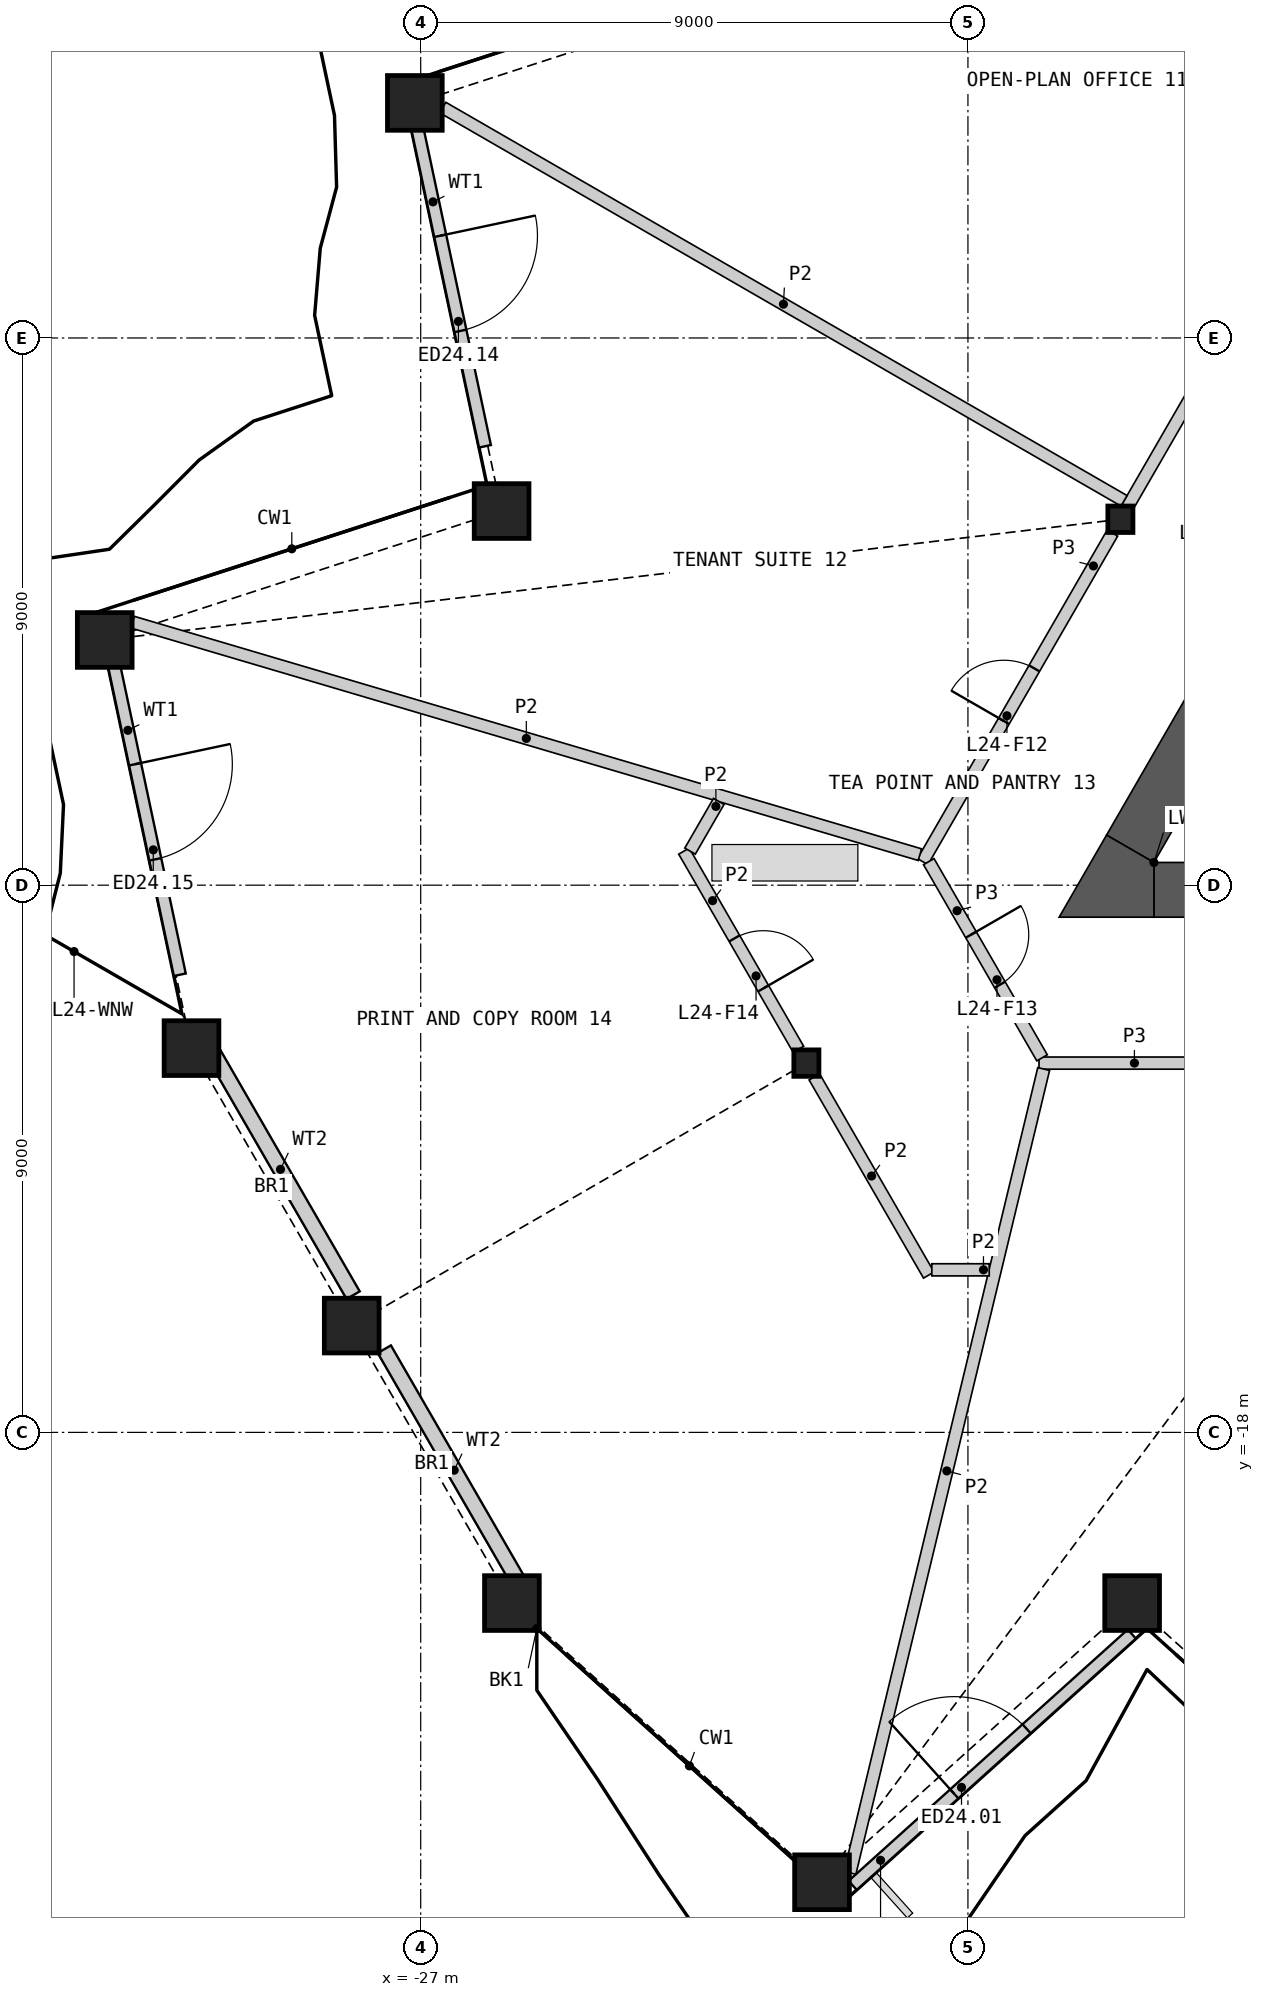
"""IFC4 building model, lengths in metres.
Left out: names, types, materials, properties, quantities, classifications, styles, units other than length and angle.
Written with IfcOpenShell. Run it as: python <this file> out.ifc"""

import sys

from ifc_helpers import new_model, si_unit, direction, frame, frame_2d, origin, origin_2d, place, context, subcontext, project, spatial, polyline, rectangle, hollow_rectangle, i_section, outline, extrude, element, fill, save


model = new_model("IFC4")
c1 = context("Model", 3, precision=1e-05, world=origin(), true_north=direction((0.0, 1.0)))
c2 = subcontext(c1, "Body", "Model", "MODEL_VIEW")
j1 = project(units=[si_unit("LENGTHUNIT", "METRE"), si_unit("PLANEANGLEUNIT", "RADIAN")], contexts=[c1])
p1 = place(None, origin())
s1 = spatial("IfcSite", under=j1, at=p1, CompositionType="ELEMENT")
p2 = place(p1, origin())
s2 = spatial("IfcBuilding", under=s1, at=p2, CompositionType="ELEMENT")
p3 = place(p2, frame((0.0, 0.0, 116.4)))
s3 = spatial("IfcBuildingStorey", under=s2, at=p3, CompositionType="ELEMENT", Elevation=116.4)
for number, where, z_axis, x_axis in (
    (1, (-25.5, -20.807, 0.0), (0.0, 0.0, 1.0), (1.0, 0.0, 0.0)),
    (2, (-20.4, -25.399, 0.0), (0.0, 0.0, 1.0), (1.0, 0.0, 0.0)),
    (3, (-15.3, -20.807, 0.0), (0.0, 0.0, 1.0), (1.0, 0.0, 0.0)),
    (4, (-27.096, 3.866, 0.0), (0.0, 0.0, 1.0), (1.0, 0.0, 0.0)),
    (5, (-25.669, -2.846, 0.0), (0.0, 0.0, 1.0), (1.0, 0.0, 0.0)),
    (6, (-32.196, -4.967, 0.0), (0.0, 0.0, 1.0), (1.0, 0.0, 0.0)),
    (7, (-30.769, -11.68, 0.0), (0.0, 0.0, 1.0), (1.0, 0.0, 0.0)),
    (8, (-28.135, -16.243, 0.0), (0.0, 0.0, 1.0), (1.0, 0.0, 0.0)),
):
    element("IfcColumn", number, at=place(p3, frame(where, z_axis=z_axis, x_axis=x_axis)), inside=s3, PredefinedType="COLUMN", context=c2, shape_type="SweptSolid", body=[
        extrude(hollow_rectangle(XDim=0.9, YDim=0.9, WallThickness=0.06, at=origin_2d()), origin(), (0.0, 0.0, 1.0), 4.2),
    ])
for number, where, z_axis, x_axis in (
    (9, (-15.493, -2.982, 0.0), (0.0, 0.0, 1.0), (1.0, 0.0, 0.0)),
    (10, (-20.657, -11.926, 0.0), (0.0, 0.0, 1.0), (1.0, 0.0, 0.0)),
):
    element("IfcColumn", number, at=place(p3, frame(where, z_axis=z_axis, x_axis=x_axis)), inside=s3, PredefinedType="COLUMN", context=c2, shape_type="SweptSolid", body=[
        extrude(i_section(OverallWidth=0.412, OverallDepth=0.435, WebThickness=0.036, FlangeThickness=0.057, at=origin_2d()), origin(), (0.0, 0.0, 1.0), 4.2),
    ])
p4 = place(p3, frame((-19.896, -25.451, 0.0), z_axis=(0.0, 0.0, 1.0), x_axis=(0.743162487272, 0.669110990428, 0.0)))
e11 = element("IfcWall", 11, at=p4, inside=s3, PredefinedType="SOLIDWALL", context=c2, shape_type="SweptSolid", body=[
    extrude(rectangle(XDim=6.178, YDim=0.2, at=frame_2d((3.089, 0.0))), origin(), (0.0, 0.0, 1.0), 3.189),
])
p5 = place(p4, frame((2.25, 0.0, 0.0)))
e12 = element("IfcOpeningElement", 12, at=p5, cuts=e11, PredefinedType="OPENING", context=c2, shape_type="SweptSolid", body=[
    extrude(rectangle(XDim=1.6, YDim=2.4, at=frame_2d((0.8, 1.2))), frame((0.0, 0.11, 0.0), z_axis=(0.0, -1.0, 0.0), x_axis=(1.0, 0.0, 0.0)), (0.0, 0.0, 1.0), 0.22),
])
p6 = place(p3, frame((-27.083, 3.579, 0.0), z_axis=(0.0, 0.0, 1.0), x_axis=(0.207898180805, -0.978150472278, 0.0)))
e13 = element("IfcWall", 13, at=p6, inside=s3, PredefinedType="SOLIDWALL", context=c2, shape_type="SweptSolid", body=[
    extrude(rectangle(XDim=5.48, YDim=0.2, at=frame_2d((2.74, 0.0))), origin(), (0.0, 0.0, 1.0), 3.189),
])
p7 = place(p6, frame((1.94, 0.0, 0.0)))
e14 = element("IfcOpeningElement", 14, at=p7, cuts=e13, PredefinedType="OPENING", context=c2, shape_type="SweptSolid", body=[
    extrude(rectangle(XDim=1.6, YDim=2.4, at=frame_2d((0.8, 1.2))), frame((0.0, 0.11, 0.0), z_axis=(0.0, -1.0, 0.0), x_axis=(1.0, 0.0, 0.0)), (0.0, 0.0, 1.0), 0.22),
])
p8 = place(p3, frame((-32.101, -5.113, 0.0), z_axis=(0.0, 0.0, 1.0), x_axis=(0.207949862117, -0.978139486395, 0.0)))
e15 = element("IfcWall", 15, at=p8, inside=s3, PredefinedType="SOLIDWALL", context=c2, shape_type="SweptSolid", body=[
    extrude(rectangle(XDim=5.48, YDim=0.2, at=frame_2d((2.74, 0.0))), origin(), (0.0, 0.0, 1.0), 3.189),
])
p9 = place(p8, frame((1.94, 0.0, 0.0)))
e16 = element("IfcOpeningElement", 16, at=p9, cuts=e15, PredefinedType="OPENING", context=c2, shape_type="SweptSolid", body=[
    extrude(rectangle(XDim=1.6, YDim=2.4, at=frame_2d((0.8, 1.2))), frame((0.0, 0.11, 0.0), z_axis=(0.0, -1.0, 0.0), x_axis=(1.0, 0.0, 0.0)), (0.0, 0.0, 1.0), 0.22),
])
p10 = place(p3, frame((-30.5, -11.604, 0.0), z_axis=(0.0, 0.0, 1.0), x_axis=(0.499984810975, -0.866034172995, 0.0)))
e17 = element("IfcWall", 17, at=p10, inside=s3, PredefinedType="SOLIDWALL", context=c2, shape_type="SweptSolid", body=[
    extrude(rectangle(XDim=4.78, YDim=0.25, at=frame_2d((2.39, 0.0))), origin(), (0.0, 0.0, 1.0), 3.189),
])
p11 = place(p3, frame((-27.598, -16.632, 0.0), z_axis=(0.0, 0.0, 1.0), x_axis=(0.500018268964, -0.866014855936, 0.0)))
e18 = element("IfcWall", 18, at=p11, inside=s3, PredefinedType="SOLIDWALL", context=c2, shape_type="SweptSolid", body=[
    extrude(rectangle(XDim=4.596, YDim=0.25, at=frame_2d((2.298, 0.0))), origin(), (0.0, 0.0, 1.0), 3.189),
])
p12 = place(p3, frame((-14.941, -9.076, 0.0), z_axis=(0.0, 0.0, 1.0), x_axis=(1.0, 0.0, 0.0)))
e19 = element("IfcWall", 19, at=p12, inside=s3, PredefinedType="SHEAR", context=c2, shape_type="SweptSolid", body=[
    extrude(rectangle(XDim=7.649, YDim=0.9, at=frame_2d((3.824, 0.0))), origin(), (0.0, 0.0, 1.0), 3.8),
])
p13 = place(p3, frame((-13.271, -4.833, 0.0), z_axis=(0.0, 0.0, 1.0), x_axis=(-0.499994272862, -0.866028710324, 0.0)))
e20 = element("IfcWall", 20, at=p13, inside=s3, PredefinedType="SHEAR", context=c2, shape_type="SweptSolid", body=[
    extrude(rectangle(XDim=4.121, YDim=0.9, at=frame_2d((2.06, 0.0))), origin(), (0.0, 0.0, 1.0), 3.8),
])
p14 = place(p3, origin())
e21 = element("IfcWall", 21, at=p14, inside=s3, PredefinedType="SHEAR", context=c2, shape_type="SweptSolid", body=[
    extrude(outline(polyline([(-14.941, -8.626), (-14.941, -9.526), (-16.5, -9.526), (-15.721, -8.176), (-14.941, -8.626)])), origin(), (0.0, 0.0, 1.0), 3.8),
])
p15 = place(p3, frame((-15.402, -2.823, 0.0), z_axis=(0.0, 0.0, 1.0), x_axis=(0.500023237168, 0.866011987384, 0.0)))
e22 = element("IfcWall", 22, at=p15, inside=s3, PredefinedType="PARTITIONING", context=c2, shape_type="SweptSolid", body=[
    extrude(rectangle(XDim=9.883, YDim=0.2, at=frame_2d((4.942, 0.0))), origin(), (0.0, 0.0, 1.0), 3.8),
])
p16 = place(p15, frame((4.492, 0.0, 0.0)))
e23 = element("IfcOpeningElement", 23, at=p16, cuts=e22, PredefinedType="OPENING", context=c2, shape_type="SweptSolid", body=[
    extrude(rectangle(XDim=1.0, YDim=2.1, at=frame_2d((0.5, 1.05))), frame((0.0, 0.11, 0.0), z_axis=(0.0, -1.0, 0.0), x_axis=(1.0, 0.0, 0.0)), (0.0, 0.0, 1.0), 0.22),
])
p17 = place(p3, frame((-16.831, -11.926, 0.0), z_axis=(0.0, 0.0, 1.0), x_axis=(1.0, 0.0, 0.0)))
e24 = element("IfcWall", 24, at=p17, inside=s3, PredefinedType="PARTITIONING", context=c2, shape_type="SweptSolid", body=[
    extrude(rectangle(XDim=6.275, YDim=0.2, at=frame_2d((3.137, 0.0))), origin(), (0.0, 0.0, 1.0), 3.8),
])
p18 = place(p17, frame((2.688, 0.0, 0.0)))
e25 = element("IfcOpeningElement", 25, at=p18, cuts=e24, PredefinedType="OPENING", context=c2, shape_type="SweptSolid", body=[
    extrude(rectangle(XDim=1.0, YDim=2.1, at=frame_2d((0.5, 1.05))), frame((0.0, 0.11, 0.0), z_axis=(0.0, -1.0, 0.0), x_axis=(1.0, 0.0, 0.0)), (0.0, 0.0, 1.0), 0.22),
])
p19 = place(p3, frame((-18.744, -8.613, 0.0), z_axis=(0.0, 0.0, 1.0), x_axis=(0.499997920671, 0.866026604282, 0.0)))
e26 = element("IfcWall", 26, at=p19, inside=s3, PredefinedType="PARTITIONING", context=c2, shape_type="SweptSolid", body=[
    extrude(rectangle(XDim=6.24, YDim=0.2, at=frame_2d((3.12, 0.0))), origin(), (0.0, 0.0, 1.0), 3.8),
])
p20 = place(p19, frame((2.67, 0.0, 0.0)))
e27 = element("IfcOpeningElement", 27, at=p20, cuts=e26, PredefinedType="OPENING", context=c2, shape_type="SweptSolid", body=[
    extrude(rectangle(XDim=1.0, YDim=2.1, at=frame_2d((0.5, 1.05))), frame((0.0, 0.11, 0.0), z_axis=(0.0, -1.0, 0.0), x_axis=(1.0, 0.0, 0.0)), (0.0, 0.0, 1.0), 0.22),
])
p21 = place(p3, frame((-18.644, -8.613, 0.0), z_axis=(0.0, 0.0, 1.0), x_axis=(0.499958791762, -0.866049194065, 0.0)))
e28 = element("IfcWall", 28, at=p21, inside=s3, PredefinedType="PARTITIONING", context=c2, shape_type="SweptSolid", body=[
    extrude(rectangle(XDim=3.726, YDim=0.2, at=frame_2d((1.863, 0.0))), origin(), (0.0, 0.0, 1.0), 3.8),
])
p22 = place(p21, frame((1.388, 0.0, 0.0)))
e29 = element("IfcOpeningElement", 29, at=p22, cuts=e28, PredefinedType="OPENING", context=c2, shape_type="SweptSolid", body=[
    extrude(rectangle(XDim=0.95, YDim=2.1, at=frame_2d((0.475, 1.05))), frame((0.0, 0.11, 0.0), z_axis=(0.0, -1.0, 0.0), x_axis=(1.0, 0.0, 0.0)), (0.0, 0.0, 1.0), 0.22),
])
p23 = place(p3, frame((-19.94, -25.244, 0.0), z_axis=(0.0, 0.0, 1.0), x_axis=(0.234226353532, 0.972182089586, 0.0)))
e30 = element("IfcWall", 30, at=p23, inside=s3, PredefinedType="PARTITIONING", context=c2, shape_type="SweptSolid", body=[
    extrude(rectangle(XDim=13.599, YDim=0.2, at=frame_2d((6.8, 0.0))), origin(), (0.0, 0.0, 1.0), 2.885),
])
p24 = place(p3, frame((-31.736, -4.675, 0.0), z_axis=(0.0, 0.0, 1.0), x_axis=(0.959053889024, -0.283223653581, 0.0)))
e31 = element("IfcWall", 31, at=p24, inside=s3, PredefinedType="PARTITIONING", context=c2, shape_type="SweptSolid", body=[
    extrude(rectangle(XDim=13.499, YDim=0.2, at=frame_2d((6.75, 0.0))), origin(), (0.0, 0.0, 1.0), 2.885),
])
p25 = place(p3, frame((-26.636, 3.79, 0.0), z_axis=(0.0, 0.0, 1.0), x_axis=(0.866029074283, -0.499993642455, 0.0)))
e32 = element("IfcWall", 32, at=p25, inside=s3, PredefinedType="PARTITIONING", context=c2, shape_type="SweptSolid", body=[
    extrude(rectangle(XDim=12.936, YDim=0.2, at=frame_2d((6.468, 0.0))), origin(), (0.0, 0.0, 1.0), 2.885),
])
p26 = place(p3, frame((-20.526, -12.154, 0.0), z_axis=(0.0, 0.0, 1.0), x_axis=(0.500046282919, -0.86599868068, 0.0)))
e33 = element("IfcWall", 33, at=p26, inside=s3, PredefinedType="PARTITIONING", context=c2, shape_type="SweptSolid", body=[
    extrude(rectangle(XDim=3.763, YDim=0.2, at=frame_2d((1.882, 0.0))), origin(), (0.0, 0.0, 1.0), 2.885),
])
p27 = place(p3, frame((-22.67, -8.44, 0.0), z_axis=(0.0, 0.0, 1.0), x_axis=(0.500018191375, -0.866014900734, 0.0)))
e34 = element("IfcWall", 34, at=p27, inside=s3, PredefinedType="PARTITIONING", context=c2, shape_type="SweptSolid", body=[
    extrude(rectangle(XDim=3.763, YDim=0.2, at=frame_2d((1.882, 0.0))), origin(), (0.0, 0.0, 1.0), 2.885),
])
p28 = place(p27, frame((1.658, 0.0, 0.0)))
e35 = element("IfcOpeningElement", 35, at=p28, cuts=e34, PredefinedType="OPENING", context=c2, shape_type="SweptSolid", body=[
    extrude(rectangle(XDim=0.95, YDim=2.1, at=frame_2d((0.475, 1.05))), frame((0.0, 0.11, 0.0), z_axis=(0.0, -1.0, 0.0), x_axis=(1.0, 0.0, 0.0)), (0.0, 0.0, 1.0), 0.22),
])
for number, where, z_axis, x_axis in (
    (36, (-18.594, -15.326, 0.0), (0.0, 0.0, 1.0), (1.0, 0.0, 0.0)),
    (37, (-22.57, -8.44, 0.0), (0.0, 0.0, 1.0), (0.5, 0.866, 0.0)),
):
    element("IfcWall", number, at=place(p3, frame(where, z_axis=z_axis, x_axis=x_axis)), inside=s3, PredefinedType="PARTITIONING", context=c2, shape_type="SweptSolid", body=[
        extrude(rectangle(XDim=0.944, YDim=0.2, at=frame_2d((0.472, 0.0))), origin(), (0.0, 0.0, 1.0), 2.885),
    ])
p29 = place(p5, origin())
e38 = element("IfcDoor", 38, at=p29, inside=s3, OperationType="DOUBLE_DOOR_SINGLE_SWING", PredefinedType="DOOR", context=c2, shape_type="SweptSolid", body=[
    extrude(rectangle(XDim=1.6, YDim=2.4, at=frame_2d((0.8, 1.2))), frame((0.0, 0.025, 0.0), z_axis=(0.0, -1.0, 0.0), x_axis=(1.0, 0.0, 0.0)), (0.0, 0.0, 1.0), 0.05),
])
fill(e12, e38)
p30 = place(p7, origin())
e39 = element("IfcDoor", 39, at=p30, inside=s3, OperationType="DOUBLE_DOOR_SINGLE_SWING", PredefinedType="DOOR", context=c2, shape_type="SweptSolid", body=[
    extrude(rectangle(XDim=1.6, YDim=2.4, at=frame_2d((0.8, 1.2))), frame((0.0, 0.025, 0.0), z_axis=(0.0, -1.0, 0.0), x_axis=(1.0, 0.0, 0.0)), (0.0, 0.0, 1.0), 0.05),
])
fill(e14, e39)
p31 = place(p9, origin())
e40 = element("IfcDoor", 40, at=p31, inside=s3, OperationType="DOUBLE_DOOR_SINGLE_SWING", PredefinedType="DOOR", context=c2, shape_type="SweptSolid", body=[
    extrude(rectangle(XDim=1.6, YDim=2.4, at=frame_2d((0.8, 1.2))), frame((0.0, 0.025, 0.0), z_axis=(0.0, -1.0, 0.0), x_axis=(1.0, 0.0, 0.0)), (0.0, 0.0, 1.0), 0.05),
])
fill(e16, e40)
p32 = place(p20, origin())
e41 = element("IfcDoor", 41, at=p32, inside=s3, OperationType="SINGLE_SWING_LEFT", PredefinedType="DOOR", context=c2, shape_type="SweptSolid", body=[
    extrude(rectangle(XDim=1.0, YDim=2.1, at=frame_2d((0.5, 1.05))), frame((0.0, 0.025, 0.0), z_axis=(0.0, -1.0, 0.0), x_axis=(1.0, 0.0, 0.0)), (0.0, 0.0, 1.0), 0.05),
])
fill(e27, e41)
p33 = place(p22, origin())
e42 = element("IfcDoor", 42, at=p33, inside=s3, OperationType="SINGLE_SWING_LEFT", PredefinedType="DOOR", context=c2, shape_type="SweptSolid", body=[
    extrude(rectangle(XDim=0.95, YDim=2.1, at=frame_2d((0.475, 1.05))), frame((0.0, 0.025, 0.0), z_axis=(0.0, -1.0, 0.0), x_axis=(1.0, 0.0, 0.0)), (0.0, 0.0, 1.0), 0.05),
])
fill(e29, e42)
p34 = place(p28, origin())
e43 = element("IfcDoor", 43, at=p34, inside=s3, OperationType="SINGLE_SWING_RIGHT", PredefinedType="DOOR", context=c2, shape_type="SweptSolid", body=[
    extrude(rectangle(XDim=0.95, YDim=2.1, at=frame_2d((0.475, 1.05))), frame((0.0, 0.025, 0.0), z_axis=(0.0, -1.0, 0.0), x_axis=(1.0, 0.0, 0.0)), (0.0, 0.0, 1.0), 0.05),
])
fill(e35, e43)
save(model, sys.argv[1])
